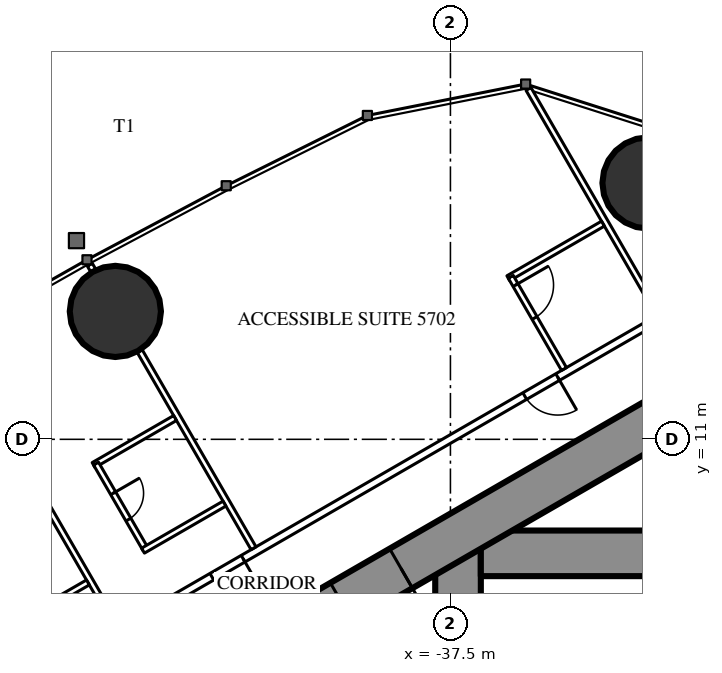
"""IFC4 building model, lengths in metres.
Left out: names, types, materials, properties, quantities, classifications, styles, units other than length and angle.
Written with IfcOpenShell. Run it as: python <this file> out.ifc"""

import sys

from ifc_helpers import new_model, si_unit, direction, frame, frame_2d, origin, origin_2d, place, context, subcontext, project, spatial, rectangle, circle, extrude, element, fill, save


model = new_model("IFC4")
c1 = context("Model", 3, precision=1e-05, world=origin(), true_north=direction((0.0, 1.0)))
c2 = subcontext(c1, "Body", "Model", "MODEL_VIEW")
j1 = project(units=[si_unit("LENGTHUNIT", "METRE"), si_unit("PLANEANGLEUNIT", "RADIAN")], contexts=[c1])
p1 = place(None, origin())
s1 = spatial("IfcSite", under=j1, at=p1, CompositionType="ELEMENT")
p2 = place(p1, origin())
s2 = spatial("IfcBuilding", under=s1, at=p2, CompositionType="ELEMENT")
p3 = place(p2, frame((0.0, 0.0, 215.3)))
s3 = spatial("IfcBuildingStorey", under=s2, at=p3, CompositionType="ELEMENT", Elevation=215.3)
for number, where, z_axis, x_axis in (
    (1, (-32.301, 17.745, 0.0), (0.0, 0.0, 1.0), (1.0, 0.0, 0.0)),
    (2, (-46.317, 14.365, 0.0), (0.0, 0.0, 1.0), (1.0, 0.0, 0.0)),
):
    element("IfcColumn", number, at=place(p3, frame(where, z_axis=z_axis, x_axis=x_axis)), inside=s3, PredefinedType="COLUMN", context=c2, shape_type="SweptSolid", body=[
        extrude(circle(Radius=1.2, at=origin_2d()), origin(), (0.0, 0.0, 1.0), 3.6),
    ])
p4 = place(p3, frame((-37.3, 8.6, 0.0), z_axis=(0.0, 0.0, 1.0), x_axis=(0.0, -1.0, 0.0)))
e3 = element("IfcWall", 3, at=p4, inside=s3, PredefinedType="SHEAR", context=c2, shape_type="SweptSolid", body=[
    extrude(rectangle(XDim=17.2, YDim=1.2, at=frame_2d((8.6, 0.0))), origin(), (0.0, 0.0, 1.0), 3.6),
])
p5 = place(p4, frame((7.7, 0.0, 0.0)))
e4 = element("IfcOpeningElement", 4, at=p5, cuts=e3, PredefinedType="OPENING", context=c2, shape_type="SweptSolid", body=[
    extrude(rectangle(XDim=1.8, YDim=2.2, at=frame_2d((0.9, 1.1))), frame((0.0, 0.61, 0.0), z_axis=(0.0, -1.0, 0.0), x_axis=(1.0, 0.0, 0.0)), (0.0, 0.0, 1.0), 1.22),
])
p6 = place(p3, frame((-28.3, 8.0, 0.0), z_axis=(0.0, 0.0, 1.0), x_axis=(-1.0, 0.0, 0.0)))
e5 = element("IfcWall", 5, at=p6, inside=s3, PredefinedType="SHEAR", context=c2, shape_type="SweptSolid", body=[
    extrude(rectangle(XDim=8.4, YDim=1.2, at=frame_2d((4.2, 0.0))), origin(), (0.0, 0.0, 1.0), 3.6),
])
p7 = place(p6, frame((0.25, 0.0, 0.0)))
e6 = element("IfcOpeningElement", 6, at=p7, cuts=e5, PredefinedType="OPENING", context=c2, shape_type="SweptSolid", body=[
    extrude(rectangle(XDim=1.0, YDim=2.2, at=frame_2d((0.5, 1.1))), frame((0.0, 0.61, 0.0), z_axis=(0.0, -1.0, 0.0), x_axis=(1.0, 0.0, 0.0)), (0.0, 0.0, 1.0), 1.22),
])
p8 = place(p3, frame((-27.2, 14.3, 0.0), z_axis=(0.0, 0.0, 1.0), x_axis=(-0.866026593062, -0.499997940104, 0.0)))
e7 = element("IfcWall", 7, at=p8, inside=s3, PredefinedType="SHEAR", context=c2, shape_type="SweptSolid", body=[
    extrude(rectangle(XDim=28.946, YDim=1.2, at=frame_2d((14.473, 0.0))), origin(), (0.0, 0.0, 1.0), 3.6),
])
p9 = place(p8, frame((4.6, 0.0, 0.0)))
e8 = element("IfcOpeningElement", 8, at=p9, cuts=e7, PredefinedType="OPENING", context=c2, shape_type="SweptSolid", body=[
    extrude(rectangle(XDim=1.0, YDim=2.2, at=frame_2d((0.5, 1.1))), frame((0.0, 0.61, 0.0), z_axis=(0.0, -1.0, 0.0), x_axis=(1.0, 0.0, 0.0)), (0.0, 0.0, 1.0), 1.22),
])
p10 = place(p8, frame((13.395, 0.0, 0.0)))
e9 = element("IfcOpeningElement", 9, at=p10, cuts=e7, PredefinedType="OPENING", context=c2, shape_type="SweptSolid", body=[
    extrude(rectangle(XDim=1.8, YDim=2.2, at=frame_2d((0.9, 1.1))), frame((0.0, 0.61, 0.0), z_axis=(0.0, -1.0, 0.0), x_axis=(1.0, 0.0, 0.0)), (0.0, 0.0, 1.0), 1.22),
])
p11 = place(p3, frame((-28.737, 16.068, 0.0), z_axis=(0.0, 0.0, 1.0), x_axis=(-0.866026057212, -0.499998868229, 0.0)))
e10 = element("IfcWall", 10, at=p11, inside=s3, PredefinedType="PARTITIONING", context=c2, shape_type="SweptSolid", body=[
    extrude(rectangle(XDim=32.137, YDim=0.2, at=frame_2d((16.068, 0.0))), origin(), (0.0, 0.0, 1.0), 3.35),
])
p12 = place(p11, frame((1.08, 0.0, 0.0)))
e11 = element("IfcOpeningElement", 11, at=p12, cuts=e10, PredefinedType="OPENING", context=c2, shape_type="SweptSolid", body=[
    extrude(rectangle(XDim=1.8, YDim=2.03, at=frame_2d((0.9, 1.015))), frame((0.0, 0.11, 0.0), z_axis=(0.0, -1.0, 0.0), x_axis=(1.0, 0.0, 0.0)), (0.0, 0.0, 1.0), 0.22),
])
p13 = place(p11, frame((6.86, 0.0, 0.0)))
e12 = element("IfcOpeningElement", 12, at=p13, cuts=e10, PredefinedType="OPENING", context=c2, shape_type="SweptSolid", body=[
    extrude(rectangle(XDim=1.0, YDim=2.2, at=frame_2d((0.5, 1.1))), frame((0.0, 0.11, 0.0), z_axis=(0.0, -1.0, 0.0), x_axis=(1.0, 0.0, 0.0)), (0.0, 0.0, 1.0), 0.22),
])
p14 = place(p11, frame((16.418, 0.0, 0.0)))
e13 = element("IfcOpeningElement", 13, at=p14, cuts=e10, PredefinedType="OPENING", context=c2, shape_type="SweptSolid", body=[
    extrude(rectangle(XDim=0.95, YDim=2.2, at=frame_2d((0.475, 1.1))), frame((0.0, 0.11, 0.0), z_axis=(0.0, -1.0, 0.0), x_axis=(1.0, 0.0, 0.0)), (0.0, 0.0, 1.0), 0.22),
])
p15 = place(p11, frame((20.567, 0.0, 0.0)))
e14 = element("IfcOpeningElement", 14, at=p15, cuts=e10, PredefinedType="OPENING", context=c2, shape_type="SweptSolid", body=[
    extrude(rectangle(XDim=0.95, YDim=2.2, at=frame_2d((0.475, 1.1))), frame((0.0, 0.11, 0.0), z_axis=(0.0, -1.0, 0.0), x_axis=(1.0, 0.0, 0.0)), (0.0, 0.0, 1.0), 0.22),
])
p16 = place(p11, frame((27.065, 0.0, 0.0)))
e15 = element("IfcOpeningElement", 15, at=p16, cuts=e10, PredefinedType="OPENING", context=c2, shape_type="SweptSolid", body=[
    extrude(rectangle(XDim=0.95, YDim=2.2, at=frame_2d((0.475, 1.1))), frame((0.0, 0.11, 0.0), z_axis=(0.0, -1.0, 0.0), x_axis=(1.0, 0.0, 0.0)), (0.0, 0.0, 1.0), 0.22),
])
p17 = place(p3, frame((-32.022, 14.287, 0.0), z_axis=(0.0, 0.0, 1.0), x_axis=(-0.50000019414, 0.866025291697, 0.0)))
e16 = element("IfcWall", 16, at=p17, inside=s3, PredefinedType="PARTITIONING", context=c2, shape_type="SweptSolid", body=[
    extrude(rectangle(XDim=6.848, YDim=0.15, at=frame_2d((3.424, 0.0))), origin(), (0.0, 0.0, 1.0), 3.35),
])
p18 = place(p3, frame((-42.68, 8.134, 0.0), z_axis=(0.0, 0.0, 1.0), x_axis=(-0.499984479505, 0.866034364361, 0.0)))
e17 = element("IfcWall", 17, at=p18, inside=s3, PredefinedType="PARTITIONING", context=c2, shape_type="SweptSolid", body=[
    extrude(rectangle(XDim=5.995, YDim=0.15, at=frame_2d((2.998, 0.0))), origin(), (0.0, 0.0, 1.0), 2.45),
])
p19 = place(p3, frame((-46.898, 15.439, 0.0), z_axis=(0.0, 0.0, 1.0), x_axis=(-0.500232303069, 0.865891241997, 0.0)))
e18 = element("IfcWall", 18, at=p19, inside=s3, PredefinedType="PARTITIONING", context=c2, shape_type="SweptSolid", body=[
    extrude(rectangle(XDim=0.18, YDim=0.15, at=frame_2d((0.09, 0.0))), origin(), (0.0, 0.0, 1.0), 2.45),
])
p20 = place(p3, frame((-46.274, 6.059, 0.0), z_axis=(0.0, 0.0, 1.0), x_axis=(-0.500020471368, 0.866013584312, 0.0)))
e19 = element("IfcWall", 19, at=p20, inside=s3, PredefinedType="PARTITIONING", context=c2, shape_type="SweptSolid", body=[
    extrude(rectangle(XDim=6.028, YDim=0.15, at=frame_2d((3.014, 0.0))), origin(), (0.0, 0.0, 1.0), 2.45),
])
p21 = place(p3, frame((-33.487, 16.675, 0.0), z_axis=(0.0, 0.0, 1.0), x_axis=(-0.866039941686, -0.499974818771, 0.0)))
e20 = element("IfcWall", 20, at=p21, inside=s3, PredefinedType="PARTITIONING", context=c2, shape_type="SweptSolid", body=[
    extrude(rectangle(XDim=2.875, YDim=0.15, at=frame_2d((1.438, 0.0))), origin(), (0.0, 0.0, 1.0), 3.35),
])
p22 = place(p3, frame((-34.511, 12.85, 0.0), z_axis=(0.0, 0.0, 1.0), x_axis=(-0.500011755427, 0.866018616679, 0.0)))
e21 = element("IfcWall", 21, at=p22, inside=s3, PredefinedType="PARTITIONING", context=c2, shape_type="SweptSolid", body=[
    extrude(rectangle(XDim=2.8, YDim=0.15, at=frame_2d((1.4, 0.0))), origin(), (0.0, 0.0, 1.0), 3.35),
])
p23 = place(p22, frame((1.55, 0.0, 0.0)))
e22 = element("IfcOpeningElement", 22, at=p23, cuts=e21, PredefinedType="OPENING", context=c2, shape_type="SweptSolid", body=[
    extrude(rectangle(XDim=1.0, YDim=2.2, at=frame_2d((0.5, 1.1))), frame((0.0, 0.085, 0.0), z_axis=(0.0, -1.0, 0.0), x_axis=(1.0, 0.0, 0.0)), (0.0, 0.0, 1.0), 0.17),
])
p24 = place(p3, frame((-44.745, 11.56, 0.0), z_axis=(0.0, 0.0, 1.0), x_axis=(-0.866006523861, -0.500032699561, 0.0)))
e23 = element("IfcWall", 23, at=p24, inside=s3, PredefinedType="PARTITIONING", context=c2, shape_type="SweptSolid", body=[
    extrude(rectangle(XDim=2.475, YDim=0.15, at=frame_2d((1.237, 0.0))), origin(), (0.0, 0.0, 1.0), 3.35),
])
p25 = place(p3, frame((-45.524, 8.109, 0.0), z_axis=(0.0, 0.0, 1.0), x_axis=(-0.49997716683, 0.86603858612, 0.0)))
e24 = element("IfcWall", 24, at=p25, inside=s3, PredefinedType="PARTITIONING", context=c2, shape_type="SweptSolid", body=[
    extrude(rectangle(XDim=2.6, YDim=0.15, at=frame_2d((1.3, 0.0))), origin(), (0.0, 0.0, 1.0), 3.35),
])
p26 = place(p25, frame((0.9, 0.0, 0.0)))
e25 = element("IfcOpeningElement", 25, at=p26, cuts=e24, PredefinedType="OPENING", context=c2, shape_type="SweptSolid", body=[
    extrude(rectangle(XDim=0.8, YDim=2.2, at=frame_2d((0.4, 1.1))), frame((0.0, 0.085, 0.0), z_axis=(0.0, -1.0, 0.0), x_axis=(1.0, 0.0, 0.0)), (0.0, 0.0, 1.0), 0.17),
])
for number, where, z_axis, x_axis in (
    (26, (-43.445, 9.309, 0.0), (0.0, 0.0, 1.0), (-0.866, -0.5, 0.0)),
    (27, (-47.039, 7.234, 0.0), (0.0, 0.0, 1.0), (-0.866, -0.5, 0.0)),
):
    element("IfcWall", number, at=place(p3, frame(where, z_axis=z_axis, x_axis=x_axis)), inside=s3, PredefinedType="PARTITIONING", context=c2, shape_type="SweptSolid", body=[
        extrude(rectangle(XDim=2.475, YDim=0.15, at=frame_2d((1.238, 0.0))), origin(), (0.0, 0.0, 1.0), 3.35),
    ])
p27 = place(p23, origin())
e28 = element("IfcDoor", 28, at=p27, inside=s3, OperationType="SINGLE_SWING_RIGHT", PredefinedType="DOOR", context=c2, shape_type="SweptSolid", body=[
    extrude(rectangle(XDim=1.0, YDim=2.2, at=frame_2d((0.5, 1.1))), frame((0.0, 0.025, 0.0), z_axis=(0.0, -1.0, 0.0), x_axis=(1.0, 0.0, 0.0)), (0.0, 0.0, 1.0), 0.05),
])
fill(e22, e28)
p28 = place(p13, origin())
e29 = element("IfcDoor", 29, at=p28, inside=s3, OperationType="SINGLE_SWING_LEFT", PredefinedType="DOOR", context=c2, shape_type="SweptSolid", body=[
    extrude(rectangle(XDim=1.0, YDim=2.2, at=frame_2d((0.5, 1.1))), frame((0.0, 0.025, 0.0), z_axis=(0.0, -1.0, 0.0), x_axis=(1.0, 0.0, 0.0)), (0.0, 0.0, 1.0), 0.05),
])
fill(e12, e29)
p29 = place(p26, origin())
e30 = element("IfcDoor", 30, at=p29, inside=s3, OperationType="SINGLE_SWING_RIGHT", PredefinedType="DOOR", context=c2, shape_type="SweptSolid", body=[
    extrude(rectangle(XDim=0.8, YDim=2.2, at=frame_2d((0.4, 1.1))), frame((0.0, 0.025, 0.0), z_axis=(0.0, -1.0, 0.0), x_axis=(1.0, 0.0, 0.0)), (0.0, 0.0, 1.0), 0.05),
])
fill(e25, e30)
p30 = place(p14, origin())
e31 = element("IfcDoor", 31, at=p30, inside=s3, OperationType="SINGLE_SWING_LEFT", PredefinedType="DOOR", context=c2, shape_type="SweptSolid", body=[
    extrude(rectangle(XDim=0.95, YDim=2.2, at=frame_2d((0.475, 1.1))), frame((0.0, 0.025, 0.0), z_axis=(0.0, -1.0, 0.0), x_axis=(1.0, 0.0, 0.0)), (0.0, 0.0, 1.0), 0.05),
])
fill(e13, e31)
p31 = place(p10, origin())
e32 = element("IfcDoor", 32, at=p31, inside=s3, OperationType="DOUBLE_DOOR_SINGLE_SWING", PredefinedType="DOOR", context=c2, shape_type="SweptSolid", body=[
    extrude(rectangle(XDim=1.8, YDim=2.2, at=frame_2d((0.9, 1.1))), frame((0.0, 0.025, 0.0), z_axis=(0.0, -1.0, 0.0), x_axis=(1.0, 0.0, 0.0)), (0.0, 0.0, 1.0), 0.05),
])
fill(e9, e32)
save(model, sys.argv[1])
